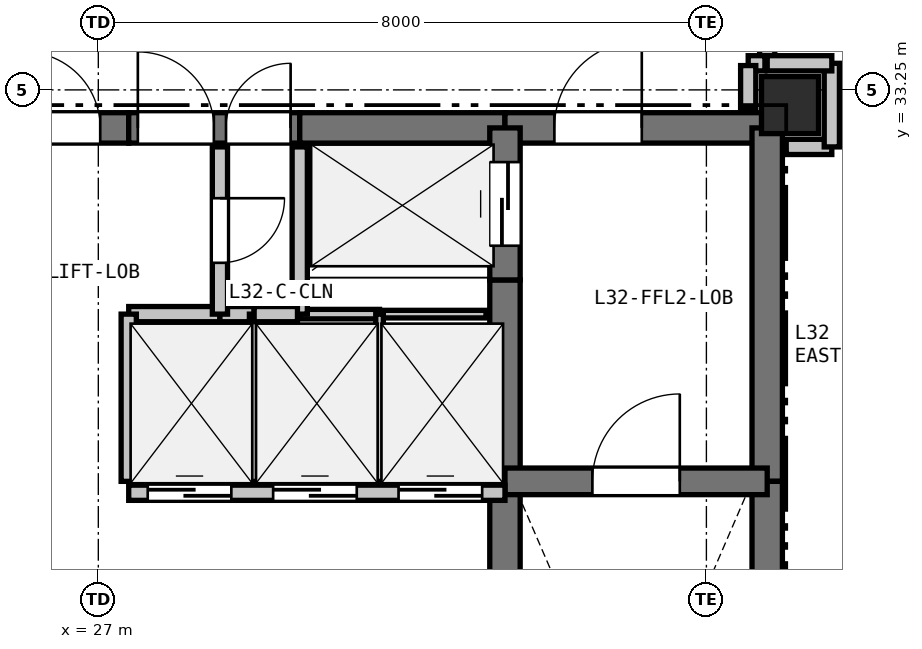
"""IFC4 building model, lengths in metres.
Left out: names, types, materials, properties, quantities, classifications, styles, units other than length and angle.
Written with IfcOpenShell. Run it as: python <this file> out.ifc"""

import sys

from ifc_helpers import new_model, si_unit, direction, frame, frame_2d, origin, origin_2d, place, context, subcontext, project, spatial, rectangle, extrude, element, fill, save


model = new_model("IFC4")
c1 = context("Model", 3, precision=1e-05, world=origin(), true_north=direction((0.0, 1.0)))
c2 = subcontext(c1, "Body", "Model", "MODEL_VIEW")
j1 = project(units=[si_unit("LENGTHUNIT", "METRE"), si_unit("PLANEANGLEUNIT", "RADIAN")], contexts=[c1])
p1 = place(None, origin())
s1 = spatial("IfcSite", under=j1, at=p1, CompositionType="ELEMENT")
p2 = place(p1, origin())
s2 = spatial("IfcBuilding", under=s1, at=p2, CompositionType="ELEMENT")
p3 = place(p2, frame((0.0, 0.0, 116.4)))
s3 = spatial("IfcBuildingStorey", under=s2, at=p3, CompositionType="ELEMENT", Elevation=116.4)
p4 = place(p3, frame((36.1, 33.05, 0.0), z_axis=(0.0, 0.0, 1.0), x_axis=(1.0, 0.0, 0.0)))
e1 = element("IfcColumn", 1, at=p4, inside=s3, PredefinedType="COLUMN", context=c2, shape_type="SweptSolid", body=[
    extrude(rectangle(XDim=0.75, YDim=0.75, at=origin_2d()), origin(), (0.0, 0.0, 1.0), 4.8),
])
p5 = place(p3, frame((25.65, 32.75, 0.0), z_axis=(0.0, 0.0, 1.0), x_axis=(1.0, 0.0, 0.0)))
e2 = element("IfcWall", 2, at=p5, inside=s3, PredefinedType="SHEAR", context=c2, shape_type="SweptSolid", body=[
    extrude(rectangle(XDim=1.75, YDim=0.4, at=frame_2d((0.875, 0.0))), origin(), (0.0, 0.0, 1.0), 4.56),
])
p6 = place(p5, frame((0.375, 0.0, 0.0)))
e3 = element("IfcOpeningElement", 3, at=p6, cuts=e2, PredefinedType="OPENING", context=c2, shape_type="SweptSolid", body=[
    extrude(rectangle(XDim=1.0, YDim=2.15, at=frame_2d((0.5, 1.075))), frame((0.0, 0.21, 0.0), z_axis=(0.0, -1.0, 0.0), x_axis=(1.0, 0.0, 0.0)), (0.0, 0.0, 1.0), 0.42),
])
p7 = place(p3, frame((27.4, 32.75, 0.0), z_axis=(0.0, 0.0, 1.0), x_axis=(1.0, 0.0, 0.0)))
e4 = element("IfcWall", 4, at=p7, inside=s3, PredefinedType="SHEAR", context=c2, shape_type="SweptSolid", body=[
    extrude(rectangle(XDim=2.25, YDim=0.4, at=frame_2d((1.125, 0.0))), origin(), (0.0, 0.0, 1.0), 4.56),
])
p8 = place(p7, frame((0.12, 0.0, 0.0)))
e5 = element("IfcOpeningElement", 5, at=p8, cuts=e4, PredefinedType="OPENING", context=c2, shape_type="SweptSolid", body=[
    extrude(rectangle(XDim=1.0, YDim=2.15, at=frame_2d((0.5, 1.075))), frame((0.0, 0.21, 0.0), z_axis=(0.0, -1.0, 0.0), x_axis=(1.0, 0.0, 0.0)), (0.0, 0.0, 1.0), 0.42),
])
p9 = place(p7, frame((1.28, 0.0, 0.0)))
e6 = element("IfcOpeningElement", 6, at=p9, cuts=e4, PredefinedType="OPENING", context=c2, shape_type="SweptSolid", body=[
    extrude(rectangle(XDim=0.85, YDim=2.1, at=frame_2d((0.425, 1.05))), frame((0.0, 0.21, 0.0), z_axis=(0.0, -1.0, 0.0), x_axis=(1.0, 0.0, 0.0)), (0.0, 0.0, 1.0), 0.42),
])
p10 = place(p3, frame((29.65, 32.75, 0.0), z_axis=(0.0, 0.0, 1.0), x_axis=(1.0, 0.0, 0.0)))
e7 = element("IfcWall", 7, at=p10, inside=s3, PredefinedType="SHEAR", context=c2, shape_type="SweptSolid", body=[
    extrude(rectangle(XDim=2.7, YDim=0.4, at=frame_2d((1.35, 0.0))), origin(), (0.0, 0.0, 1.0), 4.56),
])
p11 = place(p3, frame((32.35, 32.75, 0.0), z_axis=(0.0, 0.0, 1.0), x_axis=(1.0, 0.0, 0.0)))
e8 = element("IfcWall", 8, at=p11, inside=s3, PredefinedType="SHEAR", context=c2, shape_type="SweptSolid", body=[
    extrude(rectangle(XDim=3.45, YDim=0.4, at=frame_2d((1.725, 0.0))), origin(), (0.0, 0.0, 1.0), 4.56),
])
p12 = place(p11, frame((0.65, 0.0, 0.0)))
e9 = element("IfcOpeningElement", 9, at=p12, cuts=e8, PredefinedType="OPENING", context=c2, shape_type="SweptSolid", body=[
    extrude(rectangle(XDim=1.15, YDim=2.15, at=frame_2d((0.575, 1.075))), frame((0.0, 0.21, 0.0), z_axis=(0.0, -1.0, 0.0), x_axis=(1.0, 0.0, 0.0)), (0.0, 0.0, 1.0), 0.42),
])
p13 = place(p3, frame((35.8, 32.75, 0.0), z_axis=(0.0, 0.0, 1.0), x_axis=(0.0, -1.0, 0.0)))
e10 = element("IfcWall", 10, at=p13, inside=s3, PredefinedType="SHEAR", context=c2, shape_type="SweptSolid", body=[
    extrude(rectangle(XDim=4.65, YDim=0.4, at=frame_2d((2.325, 0.0))), origin(), (0.0, 0.0, 1.0), 4.56),
])
p14 = place(p3, frame((35.8, 28.1, 0.0), z_axis=(0.0, 0.0, 1.0), x_axis=(0.0, -1.0, 0.0)))
e11 = element("IfcWall", 11, at=p14, inside=s3, PredefinedType="SHEAR", context=c2, shape_type="SweptSolid", body=[
    extrude(rectangle(XDim=7.35, YDim=0.4, at=frame_2d((3.675, 0.0))), origin(), (0.0, 0.0, 1.0), 4.56),
])
p15 = place(p3, frame((32.35, 25.55, 0.0), z_axis=(0.0, 0.0, 1.0), x_axis=(0.0, 1.0, 0.0)))
e12 = element("IfcWall", 12, at=p15, inside=s3, PredefinedType="SHEAR", context=c2, shape_type="SweptSolid", body=[
    extrude(rectangle(XDim=2.4, YDim=0.4, at=frame_2d((1.2, 0.0))), origin(), (0.0, 0.0, 1.0), 4.56),
])
p16 = place(p3, frame((32.35, 27.95, 0.0), z_axis=(0.0, 0.0, 1.0), x_axis=(0.0, 1.0, 0.0)))
e13 = element("IfcWall", 13, at=p16, inside=s3, PredefinedType="SHEAR", context=c2, shape_type="SweptSolid", body=[
    extrude(rectangle(XDim=2.8, YDim=0.4, at=frame_2d((1.4, 0.0))), origin(), (0.0, 0.0, 1.0), 4.56),
])
p17 = place(p3, frame((32.35, 30.75, 0.0), z_axis=(0.0, 0.0, 1.0), x_axis=(0.0, 1.0, 0.0)))
e14 = element("IfcWall", 14, at=p17, inside=s3, PredefinedType="SHEAR", context=c2, shape_type="SweptSolid", body=[
    extrude(rectangle(XDim=2.0, YDim=0.4, at=frame_2d((1.0, 0.0))), origin(), (0.0, 0.0, 1.0), 4.56),
])
p18 = place(p17, frame((0.45, 0.0, 0.0)))
e15 = element("IfcOpeningElement", 15, at=p18, cuts=e14, PredefinedType="OPENING", context=c2, shape_type="SweptSolid", body=[
    extrude(rectangle(XDim=1.1, YDim=2.15, at=frame_2d((0.55, 1.075))), frame((0.0, 0.21, 0.0), z_axis=(0.0, -1.0, 0.0), x_axis=(1.0, 0.0, 0.0)), (0.0, 0.0, 1.0), 0.42),
])
p19 = place(p3, frame((32.35, 28.1, 0.0), z_axis=(0.0, 0.0, 1.0), x_axis=(1.0, 0.0, 0.0)))
e16 = element("IfcWall", 16, at=p19, inside=s3, PredefinedType="SHEAR", context=c2, shape_type="SweptSolid", body=[
    extrude(rectangle(XDim=3.45, YDim=0.35, at=frame_2d((1.725, 0.0))), origin(), (0.0, 0.0, 1.0), 4.56),
])
p20 = place(p19, frame((1.15, 0.0, 0.0)))
e17 = element("IfcOpeningElement", 17, at=p20, cuts=e16, PredefinedType="OPENING", context=c2, shape_type="SweptSolid", body=[
    extrude(rectangle(XDim=1.15, YDim=2.15, at=frame_2d((0.575, 1.075))), frame((0.0, 0.185, 0.0), z_axis=(0.0, -1.0, 0.0), x_axis=(1.0, 0.0, 0.0)), (0.0, 0.0, 1.0), 0.37),
])
p21 = place(p3, frame((27.4, 27.95, 0.0), z_axis=(0.0, 0.0, 1.0), x_axis=(1.0, 0.0, 0.0)))
e18 = element("IfcWall", 18, at=p21, inside=s3, PredefinedType="PARTITIONING", context=c2, shape_type="SweptSolid", body=[
    extrude(rectangle(XDim=4.95, YDim=0.2, at=frame_2d((2.475, 0.0))), origin(), (0.0, 0.0, 1.0), 4.56),
])
p22 = place(p21, frame((0.25, 0.0, 0.0)))
e19 = element("IfcOpeningElement", 19, at=p22, cuts=e18, PredefinedType="OPENING", context=c2, shape_type="SweptSolid", body=[
    extrude(rectangle(XDim=1.1, YDim=2.15, at=frame_2d((0.55, 1.075))), frame((0.0, 0.11, 0.0), z_axis=(0.0, -1.0, 0.0), x_axis=(1.0, 0.0, 0.0)), (0.0, 0.0, 1.0), 0.22),
])
p23 = place(p21, frame((1.9, 0.0, 0.0)))
e20 = element("IfcOpeningElement", 20, at=p23, cuts=e18, PredefinedType="OPENING", context=c2, shape_type="SweptSolid", body=[
    extrude(rectangle(XDim=1.1, YDim=2.15, at=frame_2d((0.55, 1.075))), frame((0.0, 0.11, 0.0), z_axis=(0.0, -1.0, 0.0), x_axis=(1.0, 0.0, 0.0)), (0.0, 0.0, 1.0), 0.22),
])
p24 = place(p21, frame((3.55, 0.0, 0.0)))
e21 = element("IfcOpeningElement", 21, at=p24, cuts=e18, PredefinedType="OPENING", context=c2, shape_type="SweptSolid", body=[
    extrude(rectangle(XDim=1.1, YDim=2.15, at=frame_2d((0.55, 1.075))), frame((0.0, 0.11, 0.0), z_axis=(0.0, -1.0, 0.0), x_axis=(1.0, 0.0, 0.0)), (0.0, 0.0, 1.0), 0.22),
])
p25 = place(p3, frame((32.1, 30.3, 0.0), z_axis=(0.0, 0.0, 1.0), x_axis=(-1.0, 0.0, 0.0)))
e22 = element("IfcWall", 22, at=p25, inside=s3, PredefinedType="PARTITIONING", context=c2, shape_type="SweptSolid", body=[
    extrude(rectangle(XDim=1.4, YDim=0.1, at=frame_2d((0.7, 0.0))), origin(), (0.0, 0.0, 1.0), 4.56),
])
p26 = place(p3, frame((30.7, 30.3, 0.0), z_axis=(0.0, 0.0, 1.0), x_axis=(-1.0, 0.0, 0.0)))
e23 = element("IfcWall", 23, at=p26, inside=s3, PredefinedType="PARTITIONING", context=c2, shape_type="SweptSolid", body=[
    extrude(rectangle(XDim=1.05, YDim=0.125, at=frame_2d((0.525, 0.0))), origin(), (0.0, 0.0, 1.0), 4.56),
])
p27 = place(p3, frame((29.65, 30.3, 0.0), z_axis=(0.0, 0.0, 1.0), x_axis=(0.0, 1.0, 0.0)))
e24 = element("IfcWall", 24, at=p27, inside=s3, PredefinedType="PARTITIONING", context=c2, shape_type="SweptSolid", body=[
    extrude(rectangle(XDim=2.2, YDim=0.2, at=frame_2d((1.1, 0.0))), origin(), (0.0, 0.0, 1.0), 4.56),
])
p28 = place(p3, frame((27.4, 30.3, 0.0), z_axis=(0.0, 0.0, 1.0), x_axis=(1.0, 0.0, 0.0)))
e25 = element("IfcWall", 25, at=p28, inside=s3, PredefinedType="PARTITIONING", context=c2, shape_type="SweptSolid", body=[
    extrude(rectangle(XDim=1.2, YDim=0.2, at=frame_2d((0.6, 0.0))), origin(), (0.0, 0.0, 1.0), 4.56),
])
p29 = place(p3, frame((28.6, 30.3, 0.0), z_axis=(0.0, 0.0, 1.0), x_axis=(1.0, 0.0, 0.0)))
e26 = element("IfcWall", 26, at=p29, inside=s3, PredefinedType="PARTITIONING", context=c2, shape_type="SweptSolid", body=[
    extrude(rectangle(XDim=0.45, YDim=0.2, at=frame_2d((0.225, 0.0))), origin(), (0.0, 0.0, 1.0), 4.56),
])
p30 = place(p3, frame((29.05, 30.3, 0.0), z_axis=(0.0, 0.0, 1.0), x_axis=(0.0, -1.0, 0.0)))
e27 = element("IfcWall", 27, at=p30, inside=s3, PredefinedType="PARTITIONING", context=c2, shape_type="SweptSolid", body=[
    extrude(rectangle(XDim=2.2, YDim=0.125, at=frame_2d((1.1, 0.0))), origin(), (0.0, 0.0, 1.0), 4.56),
])
p31 = place(p3, frame((27.4, 28.1, 0.0), z_axis=(0.0, 0.0, 1.0), x_axis=(0.0, 1.0, 0.0)))
e28 = element("IfcWall", 28, at=p31, inside=s3, PredefinedType="PARTITIONING", context=c2, shape_type="SweptSolid", body=[
    extrude(rectangle(XDim=2.2, YDim=0.2, at=frame_2d((1.1, 0.0))), origin(), (0.0, 0.0, 1.0), 4.56),
])
p32 = place(p3, frame((29.05, 30.3, 0.0), z_axis=(0.0, 0.0, 1.0), x_axis=(1.0, 0.0, 0.0)))
e29 = element("IfcWall", 29, at=p32, inside=s3, PredefinedType="PARTITIONING", context=c2, shape_type="SweptSolid", body=[
    extrude(rectangle(XDim=0.57, YDim=0.2, at=frame_2d((0.285, 0.0))), origin(), (0.0, 0.0, 1.0), 4.56),
])
p33 = place(p3, frame((30.7, 30.3, 0.0), z_axis=(0.0, 0.0, 1.0), x_axis=(0.0, -1.0, 0.0)))
e30 = element("IfcWall", 30, at=p33, inside=s3, PredefinedType="PARTITIONING", context=c2, shape_type="SweptSolid", body=[
    extrude(rectangle(XDim=2.2, YDim=0.1, at=frame_2d((1.1, 0.0))), origin(), (0.0, 0.0, 1.0), 4.56),
])
p34 = place(p3, frame((28.6, 32.5, 0.0), z_axis=(0.0, 0.0, 1.0), x_axis=(0.0, -1.0, 0.0)))
e31 = element("IfcWall", 31, at=p34, inside=s3, PredefinedType="PARTITIONING", context=c2, shape_type="SweptSolid", body=[
    extrude(rectangle(XDim=2.2, YDim=0.2, at=frame_2d((1.1, 0.0))), origin(), (0.0, 0.0, 1.0), 4.56),
])
p35 = place(p34, frame((0.675, 0.0, 0.0)))
e32 = element("IfcOpeningElement", 32, at=p35, cuts=e31, PredefinedType="OPENING", context=c2, shape_type="SweptSolid", body=[
    extrude(rectangle(XDim=0.85, YDim=2.1, at=frame_2d((0.425, 1.05))), frame((0.0, 0.11, 0.0), z_axis=(0.0, -1.0, 0.0), x_axis=(1.0, 0.0, 0.0)), (0.0, 0.0, 1.0), 0.22),
])
p36 = place(p3, frame((35.8, 35.35, 0.0), z_axis=(0.0, 0.0, 1.0), x_axis=(0.0, -1.0, 0.0)))
e33 = element("IfcWall", 33, at=p36, inside=s3, PredefinedType="PARTITIONING", context=c2, shape_type="SweptSolid", body=[
    extrude(rectangle(XDim=1.75, YDim=0.2, at=frame_2d((0.875, 0.0))), origin(), (0.0, 0.0, 1.0), 2.945),
])
p37 = place(p36, frame((0.375, 0.0, 0.0)))
e34 = element("IfcOpeningElement", 34, at=p37, cuts=e33, PredefinedType="OPENING", context=c2, shape_type="SweptSolid", body=[
    extrude(rectangle(XDim=1.0, YDim=2.15, at=frame_2d((0.5, 1.075))), frame((0.0, 0.11, 0.0), z_axis=(0.0, -1.0, 0.0), x_axis=(1.0, 0.0, 0.0)), (0.0, 0.0, 1.0), 0.22),
])
p38 = place(p3, frame((35.77, 33.6, 0.0), z_axis=(0.0, 0.0, 1.0), x_axis=(-1.0, 0.0, 0.0)))
e35 = element("IfcWall", 35, at=p38, inside=s3, PredefinedType="PARTITIONING", context=c2, shape_type="SweptSolid", body=[
    extrude(rectangle(XDim=0.22, YDim=0.2, at=frame_2d((0.11, 0.0))), origin(), (0.0, 0.0, 1.0), 3.195),
])
p39 = place(p3, frame((35.55, 33.57, 0.0), z_axis=(0.0, 0.0, 1.0), x_axis=(0.0, -1.0, 0.0)))
e36 = element("IfcWall", 36, at=p39, inside=s3, PredefinedType="PARTITIONING", context=c2, shape_type="SweptSolid", body=[
    extrude(rectangle(XDim=0.57, YDim=0.2, at=frame_2d((0.285, 0.0))), origin(), (0.0, 0.0, 1.0), 3.195),
])
p40 = place(p3, frame((36.05, 32.5, 0.0), z_axis=(0.0, 0.0, 1.0), x_axis=(1.0, 0.0, 0.0)))
e37 = element("IfcWall", 37, at=p40, inside=s3, PredefinedType="PARTITIONING", context=c2, shape_type="SweptSolid", body=[
    extrude(rectangle(XDim=0.6, YDim=0.2, at=frame_2d((0.3, 0.0))), origin(), (0.0, 0.0, 1.0), 4.008),
])
p41 = place(p3, frame((36.65, 32.5, 0.0), z_axis=(0.0, 0.0, 1.0), x_axis=(0.0, 1.0, 0.0)))
e38 = element("IfcWall", 38, at=p41, inside=s3, PredefinedType="PARTITIONING", context=c2, shape_type="SweptSolid", body=[
    extrude(rectangle(XDim=1.1, YDim=0.2, at=frame_2d((0.55, 0.0))), origin(), (0.0, 0.0, 1.0), 3.195),
])
p42 = place(p3, frame((36.65, 33.6, 0.0), z_axis=(0.0, 0.0, 1.0), x_axis=(-1.0, 0.0, 0.0)))
e39 = element("IfcWall", 39, at=p42, inside=s3, PredefinedType="PARTITIONING", context=c2, shape_type="SweptSolid", body=[
    extrude(rectangle(XDim=0.85, YDim=0.2, at=frame_2d((0.425, 0.0))), origin(), (0.0, 0.0, 1.0), 3.195),
])
p43 = place(p22, origin())
e40 = element("IfcDoor", 40, at=p43, inside=s3, OperationType="SLIDING_TO_LEFT", PredefinedType="DOOR", context=c2, shape_type="SweptSolid", body=[
    extrude(rectangle(XDim=1.1, YDim=2.15, at=frame_2d((0.55, 1.075))), frame((0.0, 0.025, 0.0), z_axis=(0.0, -1.0, 0.0), x_axis=(1.0, 0.0, 0.0)), (0.0, 0.0, 1.0), 0.05),
])
fill(e19, e40)
p44 = place(p23, origin())
e41 = element("IfcDoor", 41, at=p44, inside=s3, OperationType="SLIDING_TO_LEFT", PredefinedType="DOOR", context=c2, shape_type="SweptSolid", body=[
    extrude(rectangle(XDim=1.1, YDim=2.15, at=frame_2d((0.55, 1.075))), frame((0.0, 0.025, 0.0), z_axis=(0.0, -1.0, 0.0), x_axis=(1.0, 0.0, 0.0)), (0.0, 0.0, 1.0), 0.05),
])
fill(e20, e41)
p45 = place(p24, origin())
e42 = element("IfcDoor", 42, at=p45, inside=s3, OperationType="SLIDING_TO_LEFT", PredefinedType="DOOR", context=c2, shape_type="SweptSolid", body=[
    extrude(rectangle(XDim=1.1, YDim=2.15, at=frame_2d((0.55, 1.075))), frame((0.0, 0.025, 0.0), z_axis=(0.0, -1.0, 0.0), x_axis=(1.0, 0.0, 0.0)), (0.0, 0.0, 1.0), 0.05),
])
fill(e21, e42)
p46 = place(p6, origin())
e43 = element("IfcDoor", 43, at=p46, inside=s3, OperationType="SINGLE_SWING_LEFT", PredefinedType="DOOR", context=c2, shape_type="SweptSolid", body=[
    extrude(rectangle(XDim=1.0, YDim=2.15, at=frame_2d((0.5, 1.075))), frame((0.0, 0.025, 0.0), z_axis=(0.0, -1.0, 0.0), x_axis=(1.0, 0.0, 0.0)), (0.0, 0.0, 1.0), 0.05),
])
fill(e3, e43)
p47 = place(p18, origin())
e44 = element("IfcDoor", 44, at=p47, inside=s3, OperationType="SLIDING_TO_LEFT", PredefinedType="DOOR", context=c2, shape_type="SweptSolid", body=[
    extrude(rectangle(XDim=1.1, YDim=2.15, at=frame_2d((0.55, 1.075))), frame((0.0, 0.025, 0.0), z_axis=(0.0, -1.0, 0.0), x_axis=(1.0, 0.0, 0.0)), (0.0, 0.0, 1.0), 0.05),
])
fill(e15, e44)
p48 = place(p20, origin())
e45 = element("IfcDoor", 45, at=p48, inside=s3, OperationType="SINGLE_SWING_RIGHT", PredefinedType="DOOR", context=c2, shape_type="SweptSolid", body=[
    extrude(rectangle(XDim=1.15, YDim=2.15, at=frame_2d((0.575, 1.075))), frame((0.0, 0.025, 0.0), z_axis=(0.0, -1.0, 0.0), x_axis=(1.0, 0.0, 0.0)), (0.0, 0.0, 1.0), 0.05),
])
fill(e17, e45)
p49 = place(p12, origin())
e46 = element("IfcDoor", 46, at=p49, inside=s3, OperationType="SINGLE_SWING_RIGHT", PredefinedType="DOOR", context=c2, shape_type="SweptSolid", body=[
    extrude(rectangle(XDim=1.15, YDim=2.15, at=frame_2d((0.575, 1.075))), frame((0.0, 0.025, 0.0), z_axis=(0.0, -1.0, 0.0), x_axis=(1.0, 0.0, 0.0)), (0.0, 0.0, 1.0), 0.05),
])
fill(e9, e46)
p50 = place(p8, origin())
e47 = element("IfcDoor", 47, at=p50, inside=s3, OperationType="SINGLE_SWING_LEFT", PredefinedType="DOOR", context=c2, shape_type="SweptSolid", body=[
    extrude(rectangle(XDim=1.0, YDim=2.15, at=frame_2d((0.5, 1.075))), frame((0.0, 0.025, 0.0), z_axis=(0.0, -1.0, 0.0), x_axis=(1.0, 0.0, 0.0)), (0.0, 0.0, 1.0), 0.05),
])
fill(e5, e47)
p51 = place(p35, origin())
e48 = element("IfcDoor", 48, at=p51, inside=s3, OperationType="SINGLE_SWING_LEFT", PredefinedType="DOOR", context=c2, shape_type="SweptSolid", body=[
    extrude(rectangle(XDim=0.85, YDim=2.1, at=frame_2d((0.425, 1.05))), frame((0.0, 0.025, 0.0), z_axis=(0.0, -1.0, 0.0), x_axis=(1.0, 0.0, 0.0)), (0.0, 0.0, 1.0), 0.05),
])
fill(e32, e48)
p52 = place(p9, origin())
e49 = element("IfcDoor", 49, at=p52, inside=s3, OperationType="SINGLE_SWING_RIGHT", PredefinedType="DOOR", context=c2, shape_type="SweptSolid", body=[
    extrude(rectangle(XDim=0.85, YDim=2.1, at=frame_2d((0.425, 1.05))), frame((0.0, 0.025, 0.0), z_axis=(0.0, -1.0, 0.0), x_axis=(1.0, 0.0, 0.0)), (0.0, 0.0, 1.0), 0.05),
])
fill(e6, e49)
save(model, sys.argv[1])
